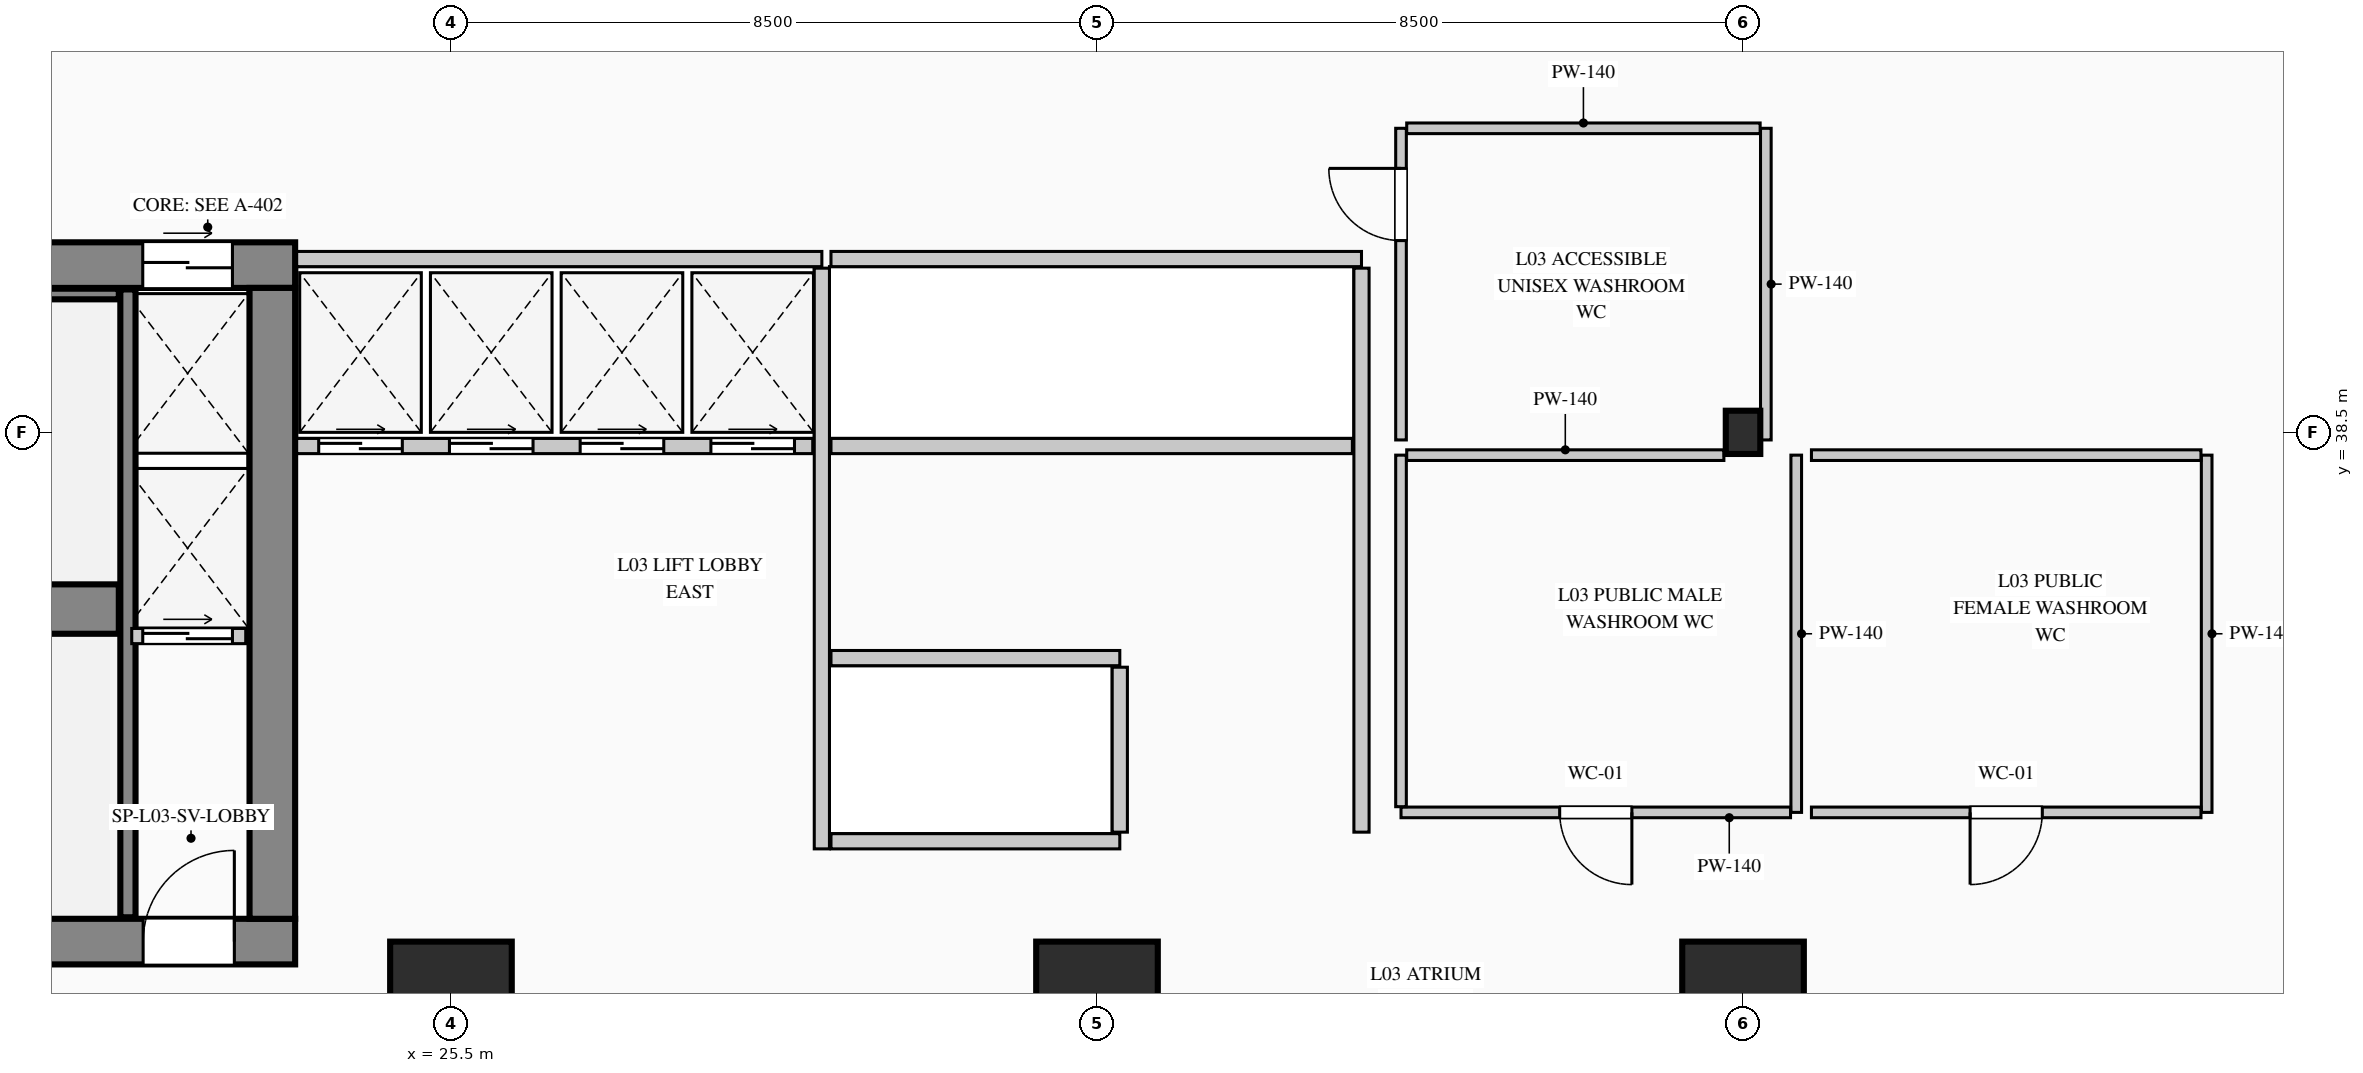
"""IFC4 building model, lengths in metres.
Left out: names, types, materials, properties, quantities, classifications, styles, units other than length and angle.
Written with IfcOpenShell. Run it as: python <this file> out.ifc"""

import sys

from ifc_helpers import new_model, si_unit, direction, frame, frame_2d, origin, origin_2d, place, context, subcontext, project, spatial, rectangle, i_section, extrude, element, fill, save


model = new_model("IFC4")
c1 = context("Model", 3, precision=1e-05, world=origin(), true_north=direction((0.0, 1.0)))
c2 = subcontext(c1, "Body", "Model", "MODEL_VIEW")
j1 = project(units=[si_unit("LENGTHUNIT", "METRE"), si_unit("PLANEANGLEUNIT", "RADIAN")], contexts=[c1])
p1 = place(None, origin())
s1 = spatial("IfcSite", under=j1, at=p1, CompositionType="ELEMENT")
p2 = place(p1, origin())
s2 = spatial("IfcBuilding", under=s1, at=p2, CompositionType="ELEMENT")
p3 = place(p2, frame((0.0, 0.0, 10.8)))
s3 = spatial("IfcBuildingStorey", under=s2, at=p3, CompositionType="ELEMENT", Elevation=10.8)
p4 = place(p3, frame((5.4, 40.7, 0.0), z_axis=(0.0, 0.0, 1.0), x_axis=(1.0, 0.0, 0.0)))
e1 = element("IfcWall", 1, at=p4, inside=s3, PredefinedType="SHEAR", context=c2, shape_type="SweptSolid", body=[
    extrude(rectangle(XDim=18.05, YDim=0.6, at=frame_2d((9.025, 0.0))), origin(), (0.0, 0.0, 1.0), 5.4),
])
p5 = place(p4, frame((16.045, 0.0, 0.0)))
e2 = element("IfcOpeningElement", 2, at=p5, cuts=e1, PredefinedType="OPENING", context=c2, shape_type="SweptSolid", body=[
    extrude(rectangle(XDim=1.18, YDim=2.25, at=frame_2d((0.59, 1.125))), frame((0.0, 0.31, 0.0), z_axis=(0.0, -1.0, 0.0), x_axis=(1.0, 0.0, 0.0)), (0.0, 0.0, 1.0), 0.62),
])
p6 = place(p3, frame((5.4, 31.8, 0.0), z_axis=(0.0, 0.0, 1.0), x_axis=(1.0, 0.0, 0.0)))
e3 = element("IfcWall", 3, at=p6, inside=s3, PredefinedType="SHEAR", context=c2, shape_type="SweptSolid", body=[
    extrude(rectangle(XDim=18.05, YDim=0.6, at=frame_2d((9.025, 0.0))), origin(), (0.0, 0.0, 1.0), 5.4),
])
p7 = place(p6, frame((3.25, 0.0, 0.0)))
e4 = element("IfcOpeningElement", 4, at=p7, cuts=e3, PredefinedType="OPENING", context=c2, shape_type="SweptSolid", body=[
    extrude(rectangle(XDim=1.2, YDim=2.2, at=frame_2d((0.6, 1.1))), frame((0.0, 0.31, 0.0), z_axis=(0.0, -1.0, 0.0), x_axis=(1.0, 0.0, 0.0)), (0.0, 0.0, 1.0), 0.62),
])
p8 = place(p6, frame((7.1, 0.0, 0.0)))
e5 = element("IfcOpeningElement", 5, at=p8, cuts=e3, PredefinedType="OPENING", context=c2, shape_type="SweptSolid", body=[
    extrude(rectangle(XDim=1.2, YDim=2.2, at=frame_2d((0.6, 1.1))), frame((0.0, 0.31, 0.0), z_axis=(0.0, -1.0, 0.0), x_axis=(1.0, 0.0, 0.0)), (0.0, 0.0, 1.0), 0.62),
])
p9 = place(p6, frame((8.95, 0.0, 0.0)))
e6 = element("IfcOpeningElement", 6, at=p9, cuts=e3, PredefinedType="OPENING", context=c2, shape_type="SweptSolid", body=[
    extrude(rectangle(XDim=1.15, YDim=2.2, at=frame_2d((0.575, 1.1))), frame((0.0, 0.31, 0.0), z_axis=(0.0, -1.0, 0.0), x_axis=(1.0, 0.0, 0.0)), (0.0, 0.0, 1.0), 0.62),
])
p10 = place(p6, frame((16.05, 0.0, 0.0)))
e7 = element("IfcOpeningElement", 7, at=p10, cuts=e3, PredefinedType="OPENING", context=c2, shape_type="SweptSolid", body=[
    extrude(rectangle(XDim=1.2, YDim=2.2, at=frame_2d((0.6, 1.1))), frame((0.0, 0.31, 0.0), z_axis=(0.0, -1.0, 0.0), x_axis=(1.0, 0.0, 0.0)), (0.0, 0.0, 1.0), 0.62),
])
p11 = place(p3, frame((23.15, 32.1, 0.0), z_axis=(0.0, 0.0, 1.0), x_axis=(0.0, 1.0, 0.0)))
e8 = element("IfcWall", 8, at=p11, inside=s3, PredefinedType="SHEAR", context=c2, shape_type="SweptSolid", body=[
    extrude(rectangle(XDim=8.3, YDim=0.6, at=frame_2d((4.15, 0.0))), origin(), (0.0, 0.0, 1.0), 5.4),
])
p12 = place(p3, frame((14.12, 36.175, 0.0), z_axis=(0.0, 0.0, 1.0), x_axis=(1.0, 0.0, 0.0)))
e9 = element("IfcWall", 9, at=p12, inside=s3, PredefinedType="SHEAR", context=c2, shape_type="SweptSolid", body=[
    extrude(rectangle(XDim=7.01, YDim=0.65, at=frame_2d((3.505, 0.0))), origin(), (0.0, 0.0, 1.0), 5.4),
])
p13 = place(p3, frame((21.25, 32.12, 0.0), z_axis=(0.0, 0.0, 1.0), x_axis=(0.0, 1.0, 0.0)))
e10 = element("IfcWall", 10, at=p13, inside=s3, PredefinedType="SHEAR", context=c2, shape_type="SweptSolid", body=[
    extrude(rectangle(XDim=8.26, YDim=0.2, at=frame_2d((4.13, 0.0))), origin(), (0.0, 0.0, 1.0), 5.4),
])
p14 = place(p3, frame((14.12, 40.32, 0.0), z_axis=(0.0, 0.0, 1.0), x_axis=(1.0, 0.0, 0.0)))
e11 = element("IfcWall", 11, at=p14, inside=s3, PredefinedType="SHEAR", context=c2, shape_type="SweptSolid", body=[
    extrude(rectangle(XDim=7.01, YDim=0.14, at=frame_2d((3.505, 0.0))), origin(), (0.0, 0.0, 1.0), 5.4),
])
for number, where, z_axis, x_axis in (
    (12, (25.5, 31.0, 0.0), (0.0, 0.0, 1.0), (1.0, 0.0, 0.0)),
    (13, (34.0, 31.0, 0.0), (0.0, 0.0, 1.0), (1.0, 0.0, 0.0)),
    (14, (42.5, 31.0, 0.0), (0.0, 0.0, 1.0), (1.0, 0.0, 0.0)),
):
    element("IfcColumn", number, at=place(p3, frame(where, z_axis=z_axis, x_axis=x_axis)), inside=s3, PredefinedType="COLUMN", context=c2, shape_type="SweptSolid", body=[
        extrude(rectangle(XDim=1.6, YDim=1.6, at=origin_2d()), origin(), (0.0, 0.0, 1.0), 5.4),
    ])
p15 = place(p3, frame((42.5, 38.5, 0.0), z_axis=(0.0, 0.0, 1.0), x_axis=(1.0, 0.0, 0.0)))
e15 = element("IfcColumn", 15, at=p15, inside=s3, PredefinedType="COLUMN", context=c2, shape_type="SweptSolid", body=[
    extrude(i_section(OverallWidth=0.454, OverallDepth=0.569, WebThickness=0.078, FlangeThickness=0.08, FilletRadius=0.015, at=origin_2d()), origin(), (0.0, 0.0, 1.0), 5.4),
])
p16 = place(p3, frame((21.3, 35.82, 0.0), z_axis=(0.0, 0.0, 1.0), x_axis=(1.0, 0.0, 0.0)))
e16 = element("IfcWall", 16, at=p16, inside=s3, PredefinedType="PARTITIONING", context=c2, shape_type="SweptSolid", body=[
    extrude(rectangle(XDim=1.5, YDim=0.2, at=frame_2d((0.75, 0.0))), origin(), (0.0, 0.0, 1.0), 5.08),
])
p17 = place(p16, frame((0.145, 0.0, 0.0)))
e17 = element("IfcOpeningElement", 17, at=p17, cuts=e16, PredefinedType="OPENING", context=c2, shape_type="SweptSolid", body=[
    extrude(rectangle(XDim=1.18, YDim=2.25, at=frame_2d((0.59, 1.125))), frame((0.0, 0.11, 0.0), z_axis=(0.0, -1.0, 0.0), x_axis=(1.0, 0.0, 0.0)), (0.0, 0.0, 1.0), 0.22),
])
p18 = place(p3, frame((23.47, 40.78, 0.0), z_axis=(0.0, 0.0, 1.0), x_axis=(1.0, 0.0, 0.0)))
e18 = element("IfcWall", 18, at=p18, inside=s3, PredefinedType="PARTITIONING", context=c2, shape_type="SweptSolid", body=[
    extrude(rectangle(XDim=6.91, YDim=0.2, at=frame_2d((3.455, 0.0))), origin(), (0.0, 0.0, 1.0), 5.08),
])
p19 = place(p3, frame((30.38, 33.02, 0.0), z_axis=(0.0, 0.0, 1.0), x_axis=(0.0, 1.0, 0.0)))
e19 = element("IfcWall", 19, at=p19, inside=s3, PredefinedType="PARTITIONING", context=c2, shape_type="SweptSolid", body=[
    extrude(rectangle(XDim=7.64, YDim=0.2, at=frame_2d((3.82, 0.0))), origin(), (0.0, 0.0, 1.0), 5.08),
])
p20 = place(p3, frame((23.47, 38.32, 0.0), z_axis=(0.0, 0.0, 1.0), x_axis=(1.0, 0.0, 0.0)))
e20 = element("IfcWall", 20, at=p20, inside=s3, PredefinedType="PARTITIONING", context=c2, shape_type="SweptSolid", body=[
    extrude(rectangle(XDim=6.79, YDim=0.2, at=frame_2d((3.395, 0.0))), origin(), (0.0, 0.0, 1.0), 5.08),
])
p21 = place(p20, frame((0.29, 0.0, 0.0)))
e21 = element("IfcOpeningElement", 21, at=p21, cuts=e20, PredefinedType="OPENING", context=c2, shape_type="SweptSolid", body=[
    extrude(rectangle(XDim=1.1, YDim=2.2, at=frame_2d((0.55, 1.1))), frame((0.0, 0.11, 0.0), z_axis=(0.0, -1.0, 0.0), x_axis=(1.0, 0.0, 0.0)), (0.0, 0.0, 1.0), 0.22),
])
p22 = place(p20, frame((2.01, 0.0, 0.0)))
e22 = element("IfcOpeningElement", 22, at=p22, cuts=e20, PredefinedType="OPENING", context=c2, shape_type="SweptSolid", body=[
    extrude(rectangle(XDim=1.1, YDim=2.2, at=frame_2d((0.55, 1.1))), frame((0.0, 0.11, 0.0), z_axis=(0.0, -1.0, 0.0), x_axis=(1.0, 0.0, 0.0)), (0.0, 0.0, 1.0), 0.22),
])
p23 = place(p20, frame((3.73, 0.0, 0.0)))
e23 = element("IfcOpeningElement", 23, at=p23, cuts=e20, PredefinedType="OPENING", context=c2, shape_type="SweptSolid", body=[
    extrude(rectangle(XDim=1.1, YDim=2.2, at=frame_2d((0.55, 1.1))), frame((0.0, 0.11, 0.0), z_axis=(0.0, -1.0, 0.0), x_axis=(1.0, 0.0, 0.0)), (0.0, 0.0, 1.0), 0.22),
])
p24 = place(p20, frame((5.45, 0.0, 0.0)))
e24 = element("IfcOpeningElement", 24, at=p24, cuts=e20, PredefinedType="OPENING", context=c2, shape_type="SweptSolid", body=[
    extrude(rectangle(XDim=1.1, YDim=2.2, at=frame_2d((0.55, 1.1))), frame((0.0, 0.11, 0.0), z_axis=(0.0, -1.0, 0.0), x_axis=(1.0, 0.0, 0.0)), (0.0, 0.0, 1.0), 0.22),
])
p25 = place(p3, frame((30.5, 40.78, 0.0), z_axis=(0.0, 0.0, 1.0), x_axis=(1.0, 0.0, 0.0)))
e25 = element("IfcWall", 25, at=p25, inside=s3, PredefinedType="PARTITIONING", context=c2, shape_type="SweptSolid", body=[
    extrude(rectangle(XDim=6.98, YDim=0.2, at=frame_2d((3.49, 0.0))), origin(), (0.0, 0.0, 1.0), 5.08),
])
p26 = place(p3, frame((37.48, 33.24, 0.0), z_axis=(0.0, 0.0, 1.0), x_axis=(0.0, 1.0, 0.0)))
e26 = element("IfcWall", 26, at=p26, inside=s3, PredefinedType="PARTITIONING", context=c2, shape_type="SweptSolid", body=[
    extrude(rectangle(XDim=7.42, YDim=0.2, at=frame_2d((3.71, 0.0))), origin(), (0.0, 0.0, 1.0), 5.08),
])
p27 = place(p3, frame((30.5, 38.32, 0.0), z_axis=(0.0, 0.0, 1.0), x_axis=(1.0, 0.0, 0.0)))
e27 = element("IfcWall", 27, at=p27, inside=s3, PredefinedType="PARTITIONING", context=c2, shape_type="SweptSolid", body=[
    extrude(rectangle(XDim=6.86, YDim=0.2, at=frame_2d((3.43, 0.0))), origin(), (0.0, 0.0, 1.0), 5.08),
])
for number, where, z_axis, x_axis in (
    (28, (30.5, 35.53, 0.0), (0.0, 0.0, 1.0), (1.0, 0.0, 0.0)),
    (29, (30.5, 33.12, 0.0), (0.0, 0.0, 1.0), (1.0, 0.0, 0.0)),
):
    element("IfcWall", number, at=place(p3, frame(where, z_axis=z_axis, x_axis=x_axis)), inside=s3, PredefinedType="PARTITIONING", context=c2, shape_type="SweptSolid", body=[
        extrude(rectangle(XDim=3.8, YDim=0.2, at=frame_2d((1.9, 0.0))), origin(), (0.0, 0.0, 1.0), 5.08),
    ])
p28 = place(p3, frame((34.3, 33.24, 0.0), z_axis=(0.0, 0.0, 1.0), x_axis=(0.0, 1.0, 0.0)))
e30 = element("IfcWall", 30, at=p28, inside=s3, PredefinedType="PARTITIONING", context=c2, shape_type="SweptSolid", body=[
    extrude(rectangle(XDim=2.17, YDim=0.2, at=frame_2d((1.085, 0.0))), origin(), (0.0, 0.0, 1.0), 5.08),
])
p29 = place(p3, frame((43.2, 38.2, 0.0), z_axis=(0.0, 0.0, 1.0), x_axis=(0.0, -1.0, 0.0)))
e31 = element("IfcWall", 31, at=p29, inside=s3, PredefinedType="PARTITIONING", context=c2, shape_type="SweptSolid", body=[
    extrude(rectangle(XDim=4.7, YDim=0.14, at=frame_2d((2.35, 0.0))), origin(), (0.0, 0.0, 1.0), 4.465),
])
p30 = place(p3, frame((43.125, 33.5, 0.0), z_axis=(0.0, 0.0, 1.0), x_axis=(-1.0, 0.0, 0.0)))
e32 = element("IfcWall", 32, at=p30, inside=s3, PredefinedType="PARTITIONING", context=c2, shape_type="SweptSolid", body=[
    extrude(rectangle(XDim=5.125, YDim=0.14, at=frame_2d((2.562, 0.0))), origin(), (0.0, 0.0, 1.0), 5.08),
])
p31 = place(p30, frame((2.087, 0.0, 0.0)))
e33 = element("IfcOpeningElement", 33, at=p31, cuts=e32, PredefinedType="OPENING", context=c2, shape_type="SweptSolid", body=[
    extrude(rectangle(XDim=0.95, YDim=2.15, at=frame_2d((0.475, 1.075))), frame((0.0, 0.08, 0.0), z_axis=(0.0, -1.0, 0.0), x_axis=(1.0, 0.0, 0.0)), (0.0, 0.0, 1.0), 0.16),
])
p32 = place(p3, frame((38.0, 33.575, 0.0), z_axis=(0.0, 0.0, 1.0), x_axis=(0.0, 1.0, 0.0)))
e34 = element("IfcWall", 34, at=p32, inside=s3, PredefinedType="PARTITIONING", context=c2, shape_type="SweptSolid", body=[
    extrude(rectangle(XDim=4.625, YDim=0.14, at=frame_2d((2.312, 0.0))), origin(), (0.0, 0.0, 1.0), 5.08),
])
p33 = place(p3, frame((38.075, 38.2, 0.0), z_axis=(0.0, 0.0, 1.0), x_axis=(1.0, 0.0, 0.0)))
e35 = element("IfcWall", 35, at=p33, inside=s3, PredefinedType="PARTITIONING", context=c2, shape_type="SweptSolid", body=[
    extrude(rectangle(XDim=4.173, YDim=0.14, at=frame_2d((2.086, 0.0))), origin(), (0.0, 0.0, 1.0), 5.08),
])
p34 = place(p3, frame((48.6, 38.2, 0.0), z_axis=(0.0, 0.0, 1.0), x_axis=(0.0, -1.0, 0.0)))
e36 = element("IfcWall", 36, at=p34, inside=s3, PredefinedType="PARTITIONING", context=c2, shape_type="SweptSolid", body=[
    extrude(rectangle(XDim=4.7, YDim=0.14, at=frame_2d((2.35, 0.0))), origin(), (0.0, 0.0, 1.0), 5.08),
])
p35 = place(p3, frame((48.525, 33.5, 0.0), z_axis=(0.0, 0.0, 1.0), x_axis=(-1.0, 0.0, 0.0)))
e37 = element("IfcWall", 37, at=p35, inside=s3, PredefinedType="PARTITIONING", context=c2, shape_type="SweptSolid", body=[
    extrude(rectangle(XDim=5.125, YDim=0.14, at=frame_2d((2.562, 0.0))), origin(), (0.0, 0.0, 1.0), 5.08),
])
p36 = place(p35, frame((2.087, 0.0, 0.0)))
e38 = element("IfcOpeningElement", 38, at=p36, cuts=e37, PredefinedType="OPENING", context=c2, shape_type="SweptSolid", body=[
    extrude(rectangle(XDim=0.95, YDim=2.15, at=frame_2d((0.475, 1.075))), frame((0.0, 0.08, 0.0), z_axis=(0.0, -1.0, 0.0), x_axis=(1.0, 0.0, 0.0)), (0.0, 0.0, 1.0), 0.16),
])
p37 = place(p3, frame((43.4, 38.2, 0.0), z_axis=(0.0, 0.0, 1.0), x_axis=(1.0, 0.0, 0.0)))
e39 = element("IfcWall", 39, at=p37, inside=s3, PredefinedType="PARTITIONING", context=c2, shape_type="SweptSolid", body=[
    extrude(rectangle(XDim=5.125, YDim=0.14, at=frame_2d((2.562, 0.0))), origin(), (0.0, 0.0, 1.0), 5.08),
])
p38 = place(p3, frame((42.8, 42.5, 0.0), z_axis=(0.0, 0.0, 1.0), x_axis=(0.0, -1.0, 0.0)))
e40 = element("IfcWall", 40, at=p38, inside=s3, PredefinedType="PARTITIONING", context=c2, shape_type="SweptSolid", body=[
    extrude(rectangle(XDim=4.1, YDim=0.14, at=frame_2d((2.05, 0.0))), origin(), (0.0, 0.0, 1.0), 5.08),
])
p39 = place(p3, frame((38.0, 38.4, 0.0), z_axis=(0.0, 0.0, 1.0), x_axis=(0.0, 1.0, 0.0)))
e41 = element("IfcWall", 41, at=p39, inside=s3, PredefinedType="PARTITIONING", context=c2, shape_type="SweptSolid", body=[
    extrude(rectangle(XDim=4.1, YDim=0.14, at=frame_2d((2.05, 0.0))), origin(), (0.0, 0.0, 1.0), 5.08),
])
p40 = place(p39, frame((2.623, 0.0, 0.0)))
e42 = element("IfcOpeningElement", 42, at=p40, cuts=e41, PredefinedType="OPENING", context=c2, shape_type="SweptSolid", body=[
    extrude(rectangle(XDim=0.95, YDim=2.15, at=frame_2d((0.475, 1.075))), frame((0.0, 0.08, 0.0), z_axis=(0.0, -1.0, 0.0), x_axis=(1.0, 0.0, 0.0)), (0.0, 0.0, 1.0), 0.16),
])
p41 = place(p3, frame((38.075, 42.5, 0.0), z_axis=(0.0, 0.0, 1.0), x_axis=(1.0, 0.0, 0.0)))
e43 = element("IfcWall", 43, at=p41, inside=s3, PredefinedType="PARTITIONING", context=c2, shape_type="SweptSolid", body=[
    extrude(rectangle(XDim=4.65, YDim=0.14, at=frame_2d((2.325, 0.0))), origin(), (0.0, 0.0, 1.0), 5.08),
])
p42 = place(p10, origin())
e44 = element("IfcDoor", 44, at=p42, inside=s3, OperationType="SINGLE_SWING_RIGHT", PredefinedType="DOOR", context=c2, shape_type="SweptSolid", body=[
    extrude(rectangle(XDim=1.2, YDim=2.2, at=frame_2d((0.6, 1.1))), frame((0.0, 0.025, 0.0), z_axis=(0.0, -1.0, 0.0), x_axis=(1.0, 0.0, 0.0)), (0.0, 0.0, 1.0), 0.05),
])
fill(e7, e44)
p43 = place(p5, origin())
e45 = element("IfcDoor", 45, at=p43, inside=s3, OperationType="DOUBLE_DOOR_SLIDING", PredefinedType="DOOR", context=c2, shape_type="SweptSolid", body=[
    extrude(rectangle(XDim=1.18, YDim=2.25, at=frame_2d((0.59, 1.125))), frame((0.0, 0.025, 0.0), z_axis=(0.0, -1.0, 0.0), x_axis=(1.0, 0.0, 0.0)), (0.0, 0.0, 1.0), 0.05),
])
fill(e2, e45)
p44 = place(p17, origin())
e46 = element("IfcDoor", 46, at=p44, inside=s3, OperationType="DOUBLE_DOOR_SLIDING", PredefinedType="DOOR", context=c2, shape_type="SweptSolid", body=[
    extrude(rectangle(XDim=1.18, YDim=2.25, at=frame_2d((0.59, 1.125))), frame((0.0, 0.025, 0.0), z_axis=(0.0, -1.0, 0.0), x_axis=(1.0, 0.0, 0.0)), (0.0, 0.0, 1.0), 0.05),
])
fill(e17, e46)
p45 = place(p21, origin())
e47 = element("IfcDoor", 47, at=p45, inside=s3, OperationType="DOUBLE_DOOR_SLIDING", PredefinedType="DOOR", context=c2, shape_type="SweptSolid", body=[
    extrude(rectangle(XDim=1.1, YDim=2.2, at=frame_2d((0.55, 1.1))), frame((0.0, 0.025, 0.0), z_axis=(0.0, -1.0, 0.0), x_axis=(1.0, 0.0, 0.0)), (0.0, 0.0, 1.0), 0.05),
])
fill(e21, e47)
p46 = place(p22, origin())
e48 = element("IfcDoor", 48, at=p46, inside=s3, OperationType="DOUBLE_DOOR_SLIDING", PredefinedType="DOOR", context=c2, shape_type="SweptSolid", body=[
    extrude(rectangle(XDim=1.1, YDim=2.2, at=frame_2d((0.55, 1.1))), frame((0.0, 0.025, 0.0), z_axis=(0.0, -1.0, 0.0), x_axis=(1.0, 0.0, 0.0)), (0.0, 0.0, 1.0), 0.05),
])
fill(e22, e48)
p47 = place(p23, origin())
e49 = element("IfcDoor", 49, at=p47, inside=s3, OperationType="DOUBLE_DOOR_SLIDING", PredefinedType="DOOR", context=c2, shape_type="SweptSolid", body=[
    extrude(rectangle(XDim=1.1, YDim=2.2, at=frame_2d((0.55, 1.1))), frame((0.0, 0.025, 0.0), z_axis=(0.0, -1.0, 0.0), x_axis=(1.0, 0.0, 0.0)), (0.0, 0.0, 1.0), 0.05),
])
fill(e23, e49)
p48 = place(p24, origin())
e50 = element("IfcDoor", 50, at=p48, inside=s3, OperationType="DOUBLE_DOOR_SLIDING", PredefinedType="DOOR", context=c2, shape_type="SweptSolid", body=[
    extrude(rectangle(XDim=1.1, YDim=2.2, at=frame_2d((0.55, 1.1))), frame((0.0, 0.025, 0.0), z_axis=(0.0, -1.0, 0.0), x_axis=(1.0, 0.0, 0.0)), (0.0, 0.0, 1.0), 0.05),
])
fill(e24, e50)
p49 = place(p31, origin())
e51 = element("IfcDoor", 51, at=p49, inside=s3, OperationType="SINGLE_SWING_LEFT", PredefinedType="DOOR", context=c2, shape_type="SweptSolid", body=[
    extrude(rectangle(XDim=0.95, YDim=2.15, at=frame_2d((0.475, 1.075))), frame((0.0, 0.025, 0.0), z_axis=(0.0, -1.0, 0.0), x_axis=(1.0, 0.0, 0.0)), (0.0, 0.0, 1.0), 0.05),
])
fill(e33, e51)
p50 = place(p36, origin())
e52 = element("IfcDoor", 52, at=p50, inside=s3, OperationType="SINGLE_SWING_RIGHT", PredefinedType="DOOR", context=c2, shape_type="SweptSolid", body=[
    extrude(rectangle(XDim=0.95, YDim=2.15, at=frame_2d((0.475, 1.075))), frame((0.0, 0.025, 0.0), z_axis=(0.0, -1.0, 0.0), x_axis=(1.0, 0.0, 0.0)), (0.0, 0.0, 1.0), 0.05),
])
fill(e38, e52)
p51 = place(p40, origin())
e53 = element("IfcDoor", 53, at=p51, inside=s3, OperationType="SINGLE_SWING_RIGHT", PredefinedType="DOOR", context=c2, shape_type="SweptSolid", body=[
    extrude(rectangle(XDim=0.95, YDim=2.15, at=frame_2d((0.475, 1.075))), frame((0.0, 0.025, 0.0), z_axis=(0.0, -1.0, 0.0), x_axis=(1.0, 0.0, 0.0)), (0.0, 0.0, 1.0), 0.05),
])
fill(e42, e53)
save(model, sys.argv[1])
